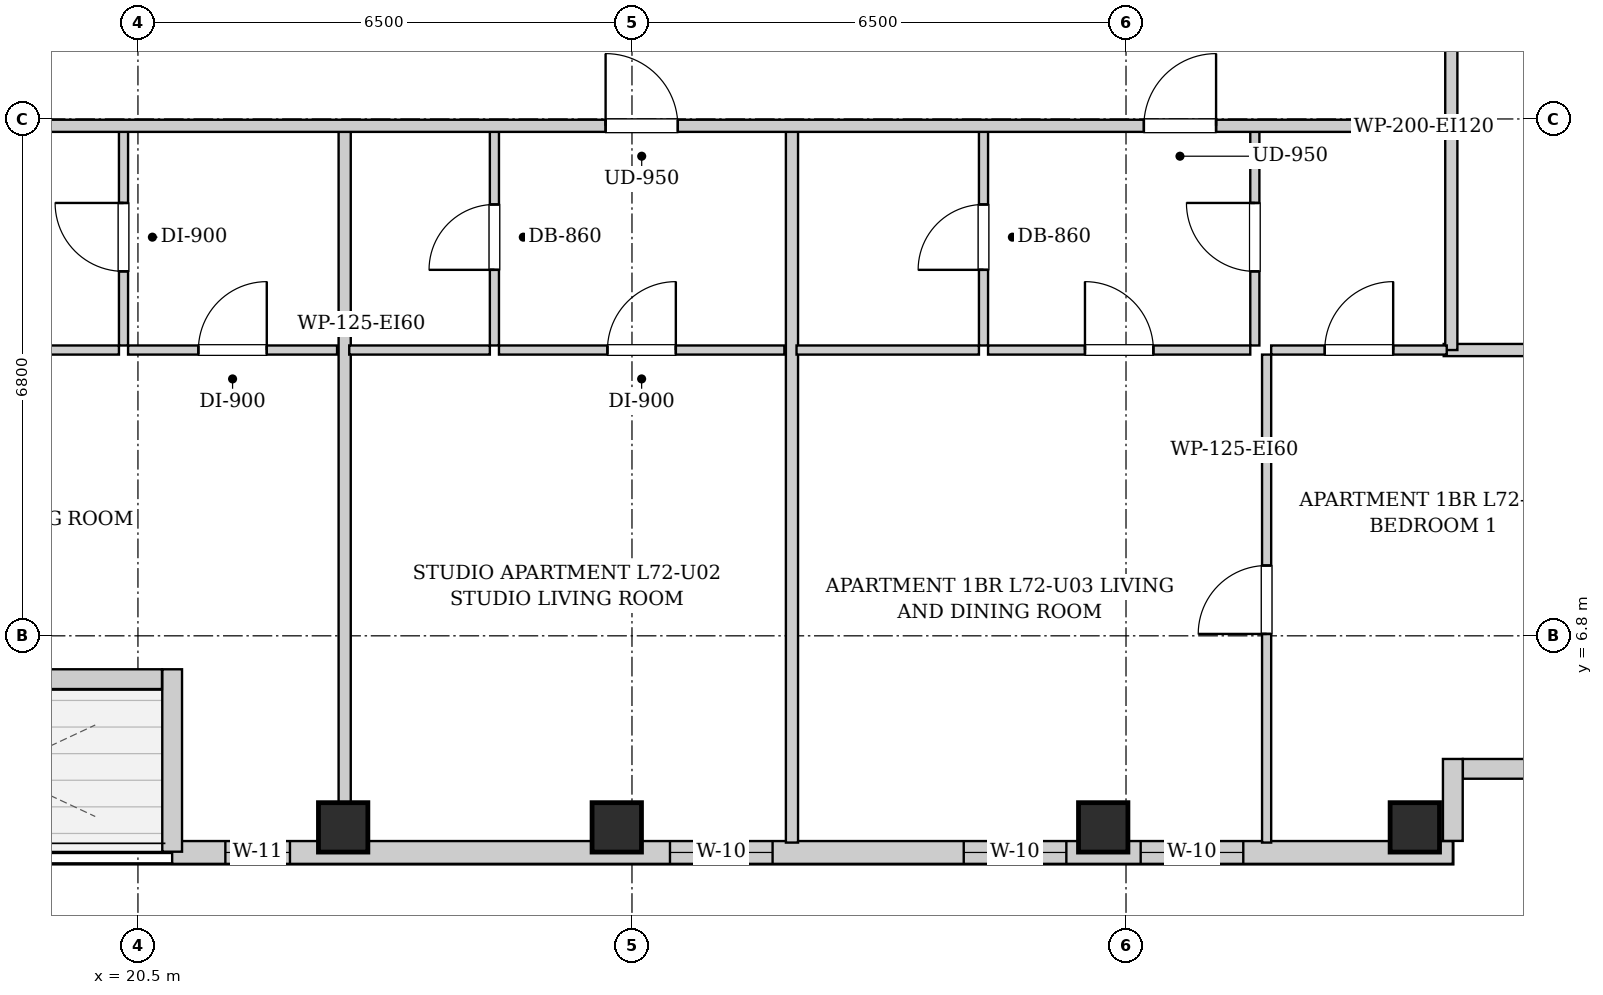
"""IFC4 building model, lengths in metres.
Left out: names, types, materials, properties, quantities, classifications, styles, units other than length and angle.
Written with IfcOpenShell. Run it as: python <this file> out.ifc"""

import sys

from ifc_helpers import new_model, si_unit, direction, frame, frame_2d, origin, origin_2d, place, context, subcontext, project, spatial, rectangle, extrude, element, fill, save


model = new_model("IFC4")
c1 = context("Model", 3, precision=1e-05, world=origin(), true_north=direction((0.0, 1.0)))
c2 = subcontext(c1, "Body", "Model", "MODEL_VIEW")
j1 = project(units=[si_unit("LENGTHUNIT", "METRE"), si_unit("PLANEANGLEUNIT", "RADIAN")], contexts=[c1])
p1 = place(None, origin())
s1 = spatial("IfcSite", under=j1, at=p1, CompositionType="ELEMENT")
p2 = place(p1, origin())
s2 = spatial("IfcBuilding", under=s1, at=p2, CompositionType="ELEMENT")
p3 = place(p2, frame((0.0, 0.0, 247.9)))
s3 = spatial("IfcBuildingStorey", under=s2, at=p3, CompositionType="ELEMENT", Elevation=247.9)
for number, where, z_axis, x_axis in (
    (1, (23.2, 4.28, 0.0), (0.0, 0.0, 1.0), (1.0, 0.0, 0.0)),
    (2, (26.8, 4.28, 0.0), (0.0, 0.0, 1.0), (1.0, 0.0, 0.0)),
    (3, (33.2, 4.28, 0.0), (0.0, 0.0, 1.0), (1.0, 0.0, 0.0)),
    (4, (37.3, 4.28, 0.0), (0.0, 0.0, 1.0), (1.0, 0.0, 0.0)),
):
    element("IfcColumn", number, at=place(p3, frame(where, z_axis=z_axis, x_axis=x_axis)), inside=s3, PredefinedType="COLUMN", context=c2, shape_type="SweptSolid", body=[
        extrude(rectangle(XDim=0.65, YDim=0.65, at=origin_2d()), origin(), (0.0, 0.0, 1.0), 3.4),
    ])
p4 = place(p3, frame((37.8, 3.95, 0.0), z_axis=(0.0, 0.0, 1.0), x_axis=(-1.0, 0.0, 0.0)))
e5 = element("IfcWall", 5, at=p4, inside=s3, PredefinedType="SOLIDWALL", context=c2, shape_type="SweptSolid", body=[
    extrude(rectangle(XDim=16.85, YDim=0.3, at=frame_2d((8.425, 0.0))), origin(), (0.0, 0.0, 1.0), 3.14),
])
p5 = place(p4, frame((15.3, 0.0, 0.55)))
e6 = element("IfcOpeningElement", 6, at=p5, cuts=e5, PredefinedType="OPENING", context=c2, shape_type="SweptSolid", body=[
    extrude(rectangle(XDim=0.85, YDim=1.2, at=frame_2d((0.425, 0.6))), frame((0.0, 0.16, 0.0), z_axis=(0.0, -1.0, 0.0), x_axis=(1.0, 0.0, 0.0)), (0.0, 0.0, 1.0), 0.32),
])
p6 = place(p4, frame((8.95, 0.0, 0.55)))
e7 = element("IfcOpeningElement", 7, at=p6, cuts=e5, PredefinedType="OPENING", context=c2, shape_type="SweptSolid", body=[
    extrude(rectangle(XDim=1.35, YDim=1.2, at=frame_2d((0.675, 0.6))), frame((0.0, 0.16, 0.0), z_axis=(0.0, -1.0, 0.0), x_axis=(1.0, 0.0, 0.0)), (0.0, 0.0, 1.0), 0.32),
])
p7 = place(p4, frame((5.085, 0.0, 0.55)))
e8 = element("IfcOpeningElement", 8, at=p7, cuts=e5, PredefinedType="OPENING", context=c2, shape_type="SweptSolid", body=[
    extrude(rectangle(XDim=1.35, YDim=1.2, at=frame_2d((0.675, 0.6))), frame((0.0, 0.16, 0.0), z_axis=(0.0, -1.0, 0.0), x_axis=(1.0, 0.0, 0.0)), (0.0, 0.0, 1.0), 0.32),
])
p8 = place(p4, frame((2.757, 0.0, 0.55)))
e9 = element("IfcOpeningElement", 9, at=p8, cuts=e5, PredefinedType="OPENING", context=c2, shape_type="SweptSolid", body=[
    extrude(rectangle(XDim=1.35, YDim=1.2, at=frame_2d((0.675, 0.6))), frame((0.0, 0.16, 0.0), z_axis=(0.0, -1.0, 0.0), x_axis=(1.0, 0.0, 0.0)), (0.0, 0.0, 1.0), 0.32),
])
p9 = place(p3, frame((20.95, 3.96, 0.0), z_axis=(0.0, 0.0, 1.0), x_axis=(0.0, 1.0, 0.0)))
e10 = element("IfcWall", 10, at=p9, inside=s3, PredefinedType="SOLIDWALL", context=c2, shape_type="SweptSolid", body=[
    extrude(rectangle(XDim=2.4, YDim=0.26, at=frame_2d((1.2, 0.0))), origin(), (0.0, 0.0, 1.0), 3.14),
])
p10 = place(p3, frame((20.816, 6.23, 0.0), z_axis=(0.0, 0.0, 1.0), x_axis=(-1.0, 0.0, 0.0)))
e11 = element("IfcWall", 11, at=p10, inside=s3, PredefinedType="SOLIDWALL", context=c2, shape_type="SweptSolid", body=[
    extrude(rectangle(XDim=4.332, YDim=0.26, at=frame_2d((2.166, 0.0))), origin(), (0.0, 0.0, 1.0), 3.14),
])
p11 = place(p10, frame((1.616, 0.0, 0.0)))
e12 = element("IfcOpeningElement", 12, at=p11, cuts=e11, PredefinedType="OPENING", context=c2, shape_type="SweptSolid", body=[
    extrude(rectangle(XDim=1.1, YDim=2.0, at=frame_2d((0.55, 1.0))), frame((0.0, 0.14, 0.0), z_axis=(0.0, -1.0, 0.0), x_axis=(1.0, 0.0, 0.0)), (0.0, 0.0, 1.0), 0.28),
])
p12 = place(p3, frame((38.918, 5.05, 0.0), z_axis=(0.0, 0.0, 1.0), x_axis=(-1.0, 0.0, 0.0)))
e13 = element("IfcWall", 13, at=p12, inside=s3, PredefinedType="SOLIDWALL", context=c2, shape_type="SweptSolid", body=[
    extrude(rectangle(XDim=0.986, YDim=0.26, at=frame_2d((0.493, 0.0))), origin(), (0.0, 0.0, 1.0), 3.14),
])
p13 = place(p3, frame((37.8, 5.18, 0.0), z_axis=(0.0, 0.0, 1.0), x_axis=(0.0, -1.0, 0.0)))
e14 = element("IfcWall", 14, at=p13, inside=s3, PredefinedType="SOLIDWALL", context=c2, shape_type="SweptSolid", body=[
    extrude(rectangle(XDim=1.078, YDim=0.26, at=frame_2d((0.539, 0.0))), origin(), (0.0, 0.0, 1.0), 3.14),
])
p14 = place(p3, frame((37.78, 13.51, 0.0), z_axis=(0.0, 0.0, 1.0), x_axis=(0.0, 1.0, 0.0)))
e15 = element("IfcWall", 15, at=p14, inside=s3, PredefinedType="PARTITIONING", context=c2, shape_type="SweptSolid", body=[
    extrude(rectangle(XDim=1.58, YDim=0.16, at=frame_2d((0.79, 0.0))), origin(), (0.0, 0.0, 1.0), 3.14),
])
p15 = place(p3, frame((20.31, 10.62, 0.0), z_axis=(0.0, 0.0, 1.0), x_axis=(0.0, 1.0, 0.0)))
e16 = element("IfcWall", 16, at=p15, inside=s3, PredefinedType="PARTITIONING", context=c2, shape_type="SweptSolid", body=[
    extrude(rectangle(XDim=2.85, YDim=0.12, at=frame_2d((1.425, 0.0))), origin(), (0.0, 0.0, 1.0), 3.14),
])
p16 = place(p15, frame((0.975, 0.0, 0.0)))
e17 = element("IfcOpeningElement", 17, at=p16, cuts=e16, PredefinedType="OPENING", context=c2, shape_type="SweptSolid", body=[
    extrude(rectangle(XDim=0.9, YDim=2.05, at=frame_2d((0.45, 1.025))), frame((0.0, 0.07, 0.0), z_axis=(0.0, -1.0, 0.0), x_axis=(1.0, 0.0, 0.0)), (0.0, 0.0, 1.0), 0.14),
])
p17 = place(p3, frame((16.8, 10.56, 0.0), z_axis=(0.0, 0.0, 1.0), x_axis=(1.0, 0.0, 0.0)))
e18 = element("IfcWall", 18, at=p17, inside=s3, PredefinedType="PARTITIONING", context=c2, shape_type="SweptSolid", body=[
    extrude(rectangle(XDim=3.45, YDim=0.12, at=frame_2d((1.725, 0.0))), origin(), (0.0, 0.0, 1.0), 3.14),
])
p18 = place(p17, frame((1.275, 0.0, 0.0)))
e19 = element("IfcOpeningElement", 19, at=p18, cuts=e18, PredefinedType="OPENING", context=c2, shape_type="SweptSolid", body=[
    extrude(rectangle(XDim=0.9, YDim=2.05, at=frame_2d((0.45, 1.025))), frame((0.0, 0.07, 0.0), z_axis=(0.0, -1.0, 0.0), x_axis=(1.0, 0.0, 0.0)), (0.0, 0.0, 1.0), 0.14),
])
p19 = place(p3, frame((20.37, 10.56, 0.0), z_axis=(0.0, 0.0, 1.0), x_axis=(1.0, 0.0, 0.0)))
e20 = element("IfcWall", 20, at=p19, inside=s3, PredefinedType="PARTITIONING", context=c2, shape_type="SweptSolid", body=[
    extrude(rectangle(XDim=2.75, YDim=0.12, at=frame_2d((1.375, 0.0))), origin(), (0.0, 0.0, 1.0), 3.14),
])
p20 = place(p19, frame((0.925, 0.0, 0.0)))
e21 = element("IfcOpeningElement", 21, at=p20, cuts=e20, PredefinedType="OPENING", context=c2, shape_type="SweptSolid", body=[
    extrude(rectangle(XDim=0.9, YDim=2.05, at=frame_2d((0.45, 1.025))), frame((0.0, 0.07, 0.0), z_axis=(0.0, -1.0, 0.0), x_axis=(1.0, 0.0, 0.0)), (0.0, 0.0, 1.0), 0.14),
])
p21 = place(p3, frame((23.22, 4.08, 0.0), z_axis=(0.0, 0.0, 1.0), x_axis=(0.0, 1.0, 0.0)))
e22 = element("IfcWall", 22, at=p21, inside=s3, PredefinedType="PARTITIONING", context=c2, shape_type="SweptSolid", body=[
    extrude(rectangle(XDim=9.39, YDim=0.16, at=frame_2d((4.695, 0.0))), origin(), (0.0, 0.0, 1.0), 3.14),
])
p22 = place(p3, frame((25.19, 10.62, 0.0), z_axis=(0.0, 0.0, 1.0), x_axis=(0.0, 1.0, 0.0)))
e23 = element("IfcWall", 23, at=p22, inside=s3, PredefinedType="PARTITIONING", context=c2, shape_type="SweptSolid", body=[
    extrude(rectangle(XDim=2.85, YDim=0.12, at=frame_2d((1.425, 0.0))), origin(), (0.0, 0.0, 1.0), 3.14),
])
p23 = place(p22, frame((0.995, 0.0, 0.0)))
e24 = element("IfcOpeningElement", 24, at=p23, cuts=e23, PredefinedType="OPENING", context=c2, shape_type="SweptSolid", body=[
    extrude(rectangle(XDim=0.86, YDim=2.05, at=frame_2d((0.43, 1.025))), frame((0.0, 0.07, 0.0), z_axis=(0.0, -1.0, 0.0), x_axis=(1.0, 0.0, 0.0)), (0.0, 0.0, 1.0), 0.14),
])
p24 = place(p3, frame((23.28, 10.56, 0.0), z_axis=(0.0, 0.0, 1.0), x_axis=(1.0, 0.0, 0.0)))
e25 = element("IfcWall", 25, at=p24, inside=s3, PredefinedType="PARTITIONING", context=c2, shape_type="SweptSolid", body=[
    extrude(rectangle(XDim=1.85, YDim=0.12, at=frame_2d((0.925, 0.0))), origin(), (0.0, 0.0, 1.0), 3.14),
])
p25 = place(p3, frame((25.25, 10.56, 0.0), z_axis=(0.0, 0.0, 1.0), x_axis=(1.0, 0.0, 0.0)))
e26 = element("IfcWall", 26, at=p25, inside=s3, PredefinedType="PARTITIONING", context=c2, shape_type="SweptSolid", body=[
    extrude(rectangle(XDim=3.755, YDim=0.12, at=frame_2d((1.877, 0.0))), origin(), (0.0, 0.0, 1.0), 3.14),
])
p26 = place(p25, frame((1.427, 0.0, 0.0)))
e27 = element("IfcOpeningElement", 27, at=p26, cuts=e26, PredefinedType="OPENING", context=c2, shape_type="SweptSolid", body=[
    extrude(rectangle(XDim=0.9, YDim=2.05, at=frame_2d((0.45, 1.025))), frame((0.0, 0.07, 0.0), z_axis=(0.0, -1.0, 0.0), x_axis=(1.0, 0.0, 0.0)), (0.0, 0.0, 1.0), 0.14),
])
p27 = place(p3, frame((37.68, 10.56, 0.0), z_axis=(0.0, 0.0, 1.0), x_axis=(1.0, 0.0, 0.0)))
e28 = element("IfcWall", 28, at=p27, inside=s3, PredefinedType="PARTITIONING", context=c2, shape_type="SweptSolid", body=[
    extrude(rectangle(XDim=2.34, YDim=0.16, at=frame_2d((1.17, 0.0))), origin(), (0.0, 0.0, 1.0), 3.14),
])
p28 = place(p3, frame((37.78, 10.56, 0.0), z_axis=(0.0, 0.0, 1.0), x_axis=(0.0, 1.0, 0.0)))
e29 = element("IfcWall", 29, at=p28, inside=s3, PredefinedType="PARTITIONING", context=c2, shape_type="SweptSolid", body=[
    extrude(rectangle(XDim=2.91, YDim=0.16, at=frame_2d((1.455, 0.0))), origin(), (0.0, 0.0, 1.0), 3.14),
])
p29 = place(p3, frame((29.105, 4.08, 0.0), z_axis=(0.0, 0.0, 1.0), x_axis=(0.0, 1.0, 0.0)))
e30 = element("IfcWall", 30, at=p29, inside=s3, PredefinedType="PARTITIONING", context=c2, shape_type="SweptSolid", body=[
    extrude(rectangle(XDim=9.39, YDim=0.16, at=frame_2d((4.695, 0.0))), origin(), (0.0, 0.0, 1.0), 3.14),
])
p30 = place(p3, frame((31.625, 10.62, 0.0), z_axis=(0.0, 0.0, 1.0), x_axis=(0.0, 1.0, 0.0)))
e31 = element("IfcWall", 31, at=p30, inside=s3, PredefinedType="PARTITIONING", context=c2, shape_type="SweptSolid", body=[
    extrude(rectangle(XDim=2.85, YDim=0.12, at=frame_2d((1.425, 0.0))), origin(), (0.0, 0.0, 1.0), 3.14),
])
p31 = place(p30, frame((0.995, 0.0, 0.0)))
e32 = element("IfcOpeningElement", 32, at=p31, cuts=e31, PredefinedType="OPENING", context=c2, shape_type="SweptSolid", body=[
    extrude(rectangle(XDim=0.86, YDim=2.05, at=frame_2d((0.43, 1.025))), frame((0.0, 0.07, 0.0), z_axis=(0.0, -1.0, 0.0), x_axis=(1.0, 0.0, 0.0)), (0.0, 0.0, 1.0), 0.14),
])
p32 = place(p3, frame((29.165, 10.56, 0.0), z_axis=(0.0, 0.0, 1.0), x_axis=(1.0, 0.0, 0.0)))
e33 = element("IfcWall", 33, at=p32, inside=s3, PredefinedType="PARTITIONING", context=c2, shape_type="SweptSolid", body=[
    extrude(rectangle(XDim=2.4, YDim=0.12, at=frame_2d((1.2, 0.0))), origin(), (0.0, 0.0, 1.0), 3.14),
])
p33 = place(p3, frame((35.195, 10.62, 0.0), z_axis=(0.0, 0.0, 1.0), x_axis=(0.0, 1.0, 0.0)))
e34 = element("IfcWall", 34, at=p33, inside=s3, PredefinedType="PARTITIONING", context=c2, shape_type="SweptSolid", body=[
    extrude(rectangle(XDim=2.85, YDim=0.12, at=frame_2d((1.425, 0.0))), origin(), (0.0, 0.0, 1.0), 3.14),
])
p34 = place(p33, frame((0.975, 0.0, 0.0)))
e35 = element("IfcOpeningElement", 35, at=p34, cuts=e34, PredefinedType="OPENING", context=c2, shape_type="SweptSolid", body=[
    extrude(rectangle(XDim=0.9, YDim=2.05, at=frame_2d((0.45, 1.025))), frame((0.0, 0.07, 0.0), z_axis=(0.0, -1.0, 0.0), x_axis=(1.0, 0.0, 0.0)), (0.0, 0.0, 1.0), 0.14),
])
p35 = place(p3, frame((31.685, 10.56, 0.0), z_axis=(0.0, 0.0, 1.0), x_axis=(1.0, 0.0, 0.0)))
e36 = element("IfcWall", 36, at=p35, inside=s3, PredefinedType="PARTITIONING", context=c2, shape_type="SweptSolid", body=[
    extrude(rectangle(XDim=3.45, YDim=0.12, at=frame_2d((1.725, 0.0))), origin(), (0.0, 0.0, 1.0), 3.14),
])
p36 = place(p35, frame((1.275, 0.0, 0.0)))
e37 = element("IfcOpeningElement", 37, at=p36, cuts=e36, PredefinedType="OPENING", context=c2, shape_type="SweptSolid", body=[
    extrude(rectangle(XDim=0.9, YDim=2.05, at=frame_2d((0.45, 1.025))), frame((0.0, 0.07, 0.0), z_axis=(0.0, -1.0, 0.0), x_axis=(1.0, 0.0, 0.0)), (0.0, 0.0, 1.0), 0.14),
])
p37 = place(p3, frame((35.41, 10.56, 0.0), z_axis=(0.0, 0.0, 1.0), x_axis=(1.0, 0.0, 0.0)))
e38 = element("IfcWall", 38, at=p37, inside=s3, PredefinedType="PARTITIONING", context=c2, shape_type="SweptSolid", body=[
    extrude(rectangle(XDim=2.31, YDim=0.12, at=frame_2d((1.155, 0.0))), origin(), (0.0, 0.0, 1.0), 3.14),
])
p38 = place(p37, frame((0.705, 0.0, 0.0)))
e39 = element("IfcOpeningElement", 39, at=p38, cuts=e38, PredefinedType="OPENING", context=c2, shape_type="SweptSolid", body=[
    extrude(rectangle(XDim=0.9, YDim=2.05, at=frame_2d((0.45, 1.025))), frame((0.0, 0.07, 0.0), z_axis=(0.0, -1.0, 0.0), x_axis=(1.0, 0.0, 0.0)), (0.0, 0.0, 1.0), 0.14),
])
p39 = place(p3, frame((35.35, 4.08, 0.0), z_axis=(0.0, 0.0, 1.0), x_axis=(0.0, 1.0, 0.0)))
e40 = element("IfcWall", 40, at=p39, inside=s3, PredefinedType="PARTITIONING", context=c2, shape_type="SweptSolid", body=[
    extrude(rectangle(XDim=6.42, YDim=0.12, at=frame_2d((3.21, 0.0))), origin(), (0.0, 0.0, 1.0), 3.14),
])
p40 = place(p39, frame((2.745, 0.0, 0.0)))
e41 = element("IfcOpeningElement", 41, at=p40, cuts=e40, PredefinedType="OPENING", context=c2, shape_type="SweptSolid", body=[
    extrude(rectangle(XDim=0.9, YDim=2.05, at=frame_2d((0.45, 1.025))), frame((0.0, 0.07, 0.0), z_axis=(0.0, -1.0, 0.0), x_axis=(1.0, 0.0, 0.0)), (0.0, 0.0, 1.0), 0.14),
])
p41 = place(p3, frame((13.15, 13.51, 0.0), z_axis=(0.0, 0.0, 1.0), x_axis=(1.0, 0.0, 0.0)))
e42 = element("IfcWall", 42, at=p41, inside=s3, PredefinedType="PARTITIONING", context=c2, shape_type="SweptSolid", body=[
    extrude(rectangle(XDim=24.6, YDim=0.16, at=frame_2d((12.3, 0.0))), origin(), (0.0, 0.0, 1.0), 3.14),
])
p42 = place(p41, frame((5.185, 0.0, 0.0)))
e43 = element("IfcOpeningElement", 43, at=p42, cuts=e42, PredefinedType="OPENING", context=c2, shape_type="SweptSolid", body=[
    extrude(rectangle(XDim=0.95, YDim=2.1, at=frame_2d((0.475, 1.05))), frame((0.0, 0.09, 0.0), z_axis=(0.0, -1.0, 0.0), x_axis=(1.0, 0.0, 0.0)), (0.0, 0.0, 1.0), 0.18),
])
p43 = place(p41, frame((13.503, 0.0, 0.0)))
e44 = element("IfcOpeningElement", 44, at=p43, cuts=e42, PredefinedType="OPENING", context=c2, shape_type="SweptSolid", body=[
    extrude(rectangle(XDim=0.95, YDim=2.1, at=frame_2d((0.475, 1.05))), frame((0.0, 0.09, 0.0), z_axis=(0.0, -1.0, 0.0), x_axis=(1.0, 0.0, 0.0)), (0.0, 0.0, 1.0), 0.18),
])
p44 = place(p41, frame((20.585, 0.0, 0.0)))
e45 = element("IfcOpeningElement", 45, at=p44, cuts=e42, PredefinedType="OPENING", context=c2, shape_type="SweptSolid", body=[
    extrude(rectangle(XDim=0.95, YDim=2.1, at=frame_2d((0.475, 1.05))), frame((0.0, 0.09, 0.0), z_axis=(0.0, -1.0, 0.0), x_axis=(1.0, 0.0, 0.0)), (0.0, 0.0, 1.0), 0.18),
])
p45 = place(p16, origin())
e46 = element("IfcDoor", 46, at=p45, inside=s3, OperationType="SINGLE_SWING_RIGHT", PredefinedType="DOOR", context=c2, shape_type="SweptSolid", body=[
    extrude(rectangle(XDim=0.9, YDim=2.05, at=frame_2d((0.45, 1.025))), frame((0.0, 0.025, 0.0), z_axis=(0.0, -1.0, 0.0), x_axis=(1.0, 0.0, 0.0)), (0.0, 0.0, 1.0), 0.05),
])
fill(e17, e46)
p46 = place(p20, origin())
e47 = element("IfcDoor", 47, at=p46, inside=s3, OperationType="SINGLE_SWING_RIGHT", PredefinedType="DOOR", context=c2, shape_type="SweptSolid", body=[
    extrude(rectangle(XDim=0.9, YDim=2.05, at=frame_2d((0.45, 1.025))), frame((0.0, 0.025, 0.0), z_axis=(0.0, -1.0, 0.0), x_axis=(1.0, 0.0, 0.0)), (0.0, 0.0, 1.0), 0.05),
])
fill(e21, e47)
p47 = place(p23, origin())
e48 = element("IfcDoor", 48, at=p47, inside=s3, OperationType="SINGLE_SWING_LEFT", PredefinedType="DOOR", context=c2, shape_type="SweptSolid", body=[
    extrude(rectangle(XDim=0.86, YDim=2.05, at=frame_2d((0.43, 1.025))), frame((0.0, 0.025, 0.0), z_axis=(0.0, -1.0, 0.0), x_axis=(1.0, 0.0, 0.0)), (0.0, 0.0, 1.0), 0.05),
])
fill(e24, e48)
p48 = place(p26, origin())
e49 = element("IfcDoor", 49, at=p48, inside=s3, OperationType="SINGLE_SWING_RIGHT", PredefinedType="DOOR", context=c2, shape_type="SweptSolid", body=[
    extrude(rectangle(XDim=0.9, YDim=2.05, at=frame_2d((0.45, 1.025))), frame((0.0, 0.025, 0.0), z_axis=(0.0, -1.0, 0.0), x_axis=(1.0, 0.0, 0.0)), (0.0, 0.0, 1.0), 0.05),
])
fill(e27, e49)
p49 = place(p31, origin())
e50 = element("IfcDoor", 50, at=p49, inside=s3, OperationType="SINGLE_SWING_LEFT", PredefinedType="DOOR", context=c2, shape_type="SweptSolid", body=[
    extrude(rectangle(XDim=0.86, YDim=2.05, at=frame_2d((0.43, 1.025))), frame((0.0, 0.025, 0.0), z_axis=(0.0, -1.0, 0.0), x_axis=(1.0, 0.0, 0.0)), (0.0, 0.0, 1.0), 0.05),
])
fill(e32, e50)
p50 = place(p34, origin())
e51 = element("IfcDoor", 51, at=p50, inside=s3, OperationType="SINGLE_SWING_RIGHT", PredefinedType="DOOR", context=c2, shape_type="SweptSolid", body=[
    extrude(rectangle(XDim=0.9, YDim=2.05, at=frame_2d((0.45, 1.025))), frame((0.0, 0.025, 0.0), z_axis=(0.0, -1.0, 0.0), x_axis=(1.0, 0.0, 0.0)), (0.0, 0.0, 1.0), 0.05),
])
fill(e35, e51)
p51 = place(p36, origin())
e52 = element("IfcDoor", 52, at=p51, inside=s3, OperationType="SINGLE_SWING_LEFT", PredefinedType="DOOR", context=c2, shape_type="SweptSolid", body=[
    extrude(rectangle(XDim=0.9, YDim=2.05, at=frame_2d((0.45, 1.025))), frame((0.0, 0.025, 0.0), z_axis=(0.0, -1.0, 0.0), x_axis=(1.0, 0.0, 0.0)), (0.0, 0.0, 1.0), 0.05),
])
fill(e37, e52)
p52 = place(p38, origin())
e53 = element("IfcDoor", 53, at=p52, inside=s3, OperationType="SINGLE_SWING_RIGHT", PredefinedType="DOOR", context=c2, shape_type="SweptSolid", body=[
    extrude(rectangle(XDim=0.9, YDim=2.05, at=frame_2d((0.45, 1.025))), frame((0.0, 0.025, 0.0), z_axis=(0.0, -1.0, 0.0), x_axis=(1.0, 0.0, 0.0)), (0.0, 0.0, 1.0), 0.05),
])
fill(e39, e53)
p53 = place(p40, origin())
e54 = element("IfcDoor", 54, at=p53, inside=s3, OperationType="SINGLE_SWING_LEFT", PredefinedType="DOOR", context=c2, shape_type="SweptSolid", body=[
    extrude(rectangle(XDim=0.9, YDim=2.05, at=frame_2d((0.45, 1.025))), frame((0.0, 0.025, 0.0), z_axis=(0.0, -1.0, 0.0), x_axis=(1.0, 0.0, 0.0)), (0.0, 0.0, 1.0), 0.05),
])
fill(e41, e54)
p54 = place(p43, origin())
e55 = element("IfcDoor", 55, at=p54, inside=s3, OperationType="SINGLE_SWING_LEFT", PredefinedType="DOOR", context=c2, shape_type="SweptSolid", body=[
    extrude(rectangle(XDim=0.95, YDim=2.1, at=frame_2d((0.475, 1.05))), frame((0.0, 0.025, 0.0), z_axis=(0.0, -1.0, 0.0), x_axis=(1.0, 0.0, 0.0)), (0.0, 0.0, 1.0), 0.05),
])
fill(e44, e55)
p55 = place(p44, origin())
e56 = element("IfcDoor", 56, at=p55, inside=s3, OperationType="SINGLE_SWING_RIGHT", PredefinedType="DOOR", context=c2, shape_type="SweptSolid", body=[
    extrude(rectangle(XDim=0.95, YDim=2.1, at=frame_2d((0.475, 1.05))), frame((0.0, 0.025, 0.0), z_axis=(0.0, -1.0, 0.0), x_axis=(1.0, 0.0, 0.0)), (0.0, 0.0, 1.0), 0.05),
])
fill(e45, e56)
p56 = place(p5, origin())
e57 = element("IfcWindow", 57, at=p56, inside=s3, PartitioningType="SINGLE_PANEL", PredefinedType="WINDOW", context=c2, shape_type="SweptSolid", body=[
    extrude(rectangle(XDim=0.85, YDim=1.2, at=frame_2d((0.425, 0.6))), frame((0.0, 0.03, 0.0), z_axis=(0.0, -1.0, 0.0), x_axis=(1.0, 0.0, 0.0)), (0.0, 0.0, 1.0), 0.06),
])
fill(e6, e57)
p57 = place(p6, origin())
e58 = element("IfcWindow", 58, at=p57, inside=s3, PartitioningType="SINGLE_PANEL", PredefinedType="WINDOW", context=c2, shape_type="SweptSolid", body=[
    extrude(rectangle(XDim=1.35, YDim=1.2, at=frame_2d((0.675, 0.6))), frame((0.0, 0.03, 0.0), z_axis=(0.0, -1.0, 0.0), x_axis=(1.0, 0.0, 0.0)), (0.0, 0.0, 1.0), 0.06),
])
fill(e7, e58)
p58 = place(p7, origin())
e59 = element("IfcWindow", 59, at=p58, inside=s3, PartitioningType="SINGLE_PANEL", PredefinedType="WINDOW", context=c2, shape_type="SweptSolid", body=[
    extrude(rectangle(XDim=1.35, YDim=1.2, at=frame_2d((0.675, 0.6))), frame((0.0, 0.03, 0.0), z_axis=(0.0, -1.0, 0.0), x_axis=(1.0, 0.0, 0.0)), (0.0, 0.0, 1.0), 0.06),
])
fill(e8, e59)
p59 = place(p8, origin())
e60 = element("IfcWindow", 60, at=p59, inside=s3, PartitioningType="SINGLE_PANEL", PredefinedType="WINDOW", context=c2, shape_type="SweptSolid", body=[
    extrude(rectangle(XDim=1.35, YDim=1.2, at=frame_2d((0.675, 0.6))), frame((0.0, 0.03, 0.0), z_axis=(0.0, -1.0, 0.0), x_axis=(1.0, 0.0, 0.0)), (0.0, 0.0, 1.0), 0.06),
])
fill(e9, e60)
save(model, sys.argv[1])
